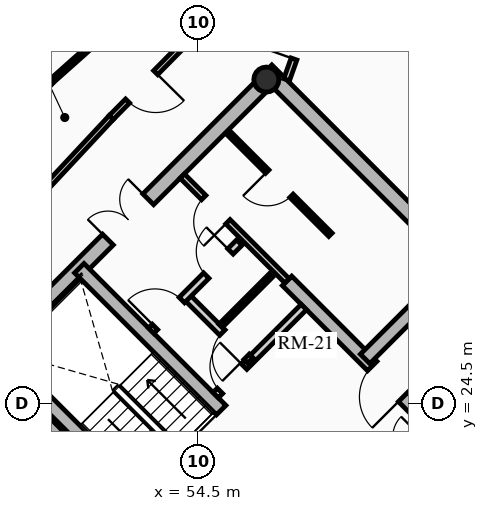
"""IFC4 building model, lengths in metres.
Left out: names, types, materials, properties, quantities, classifications, styles, units other than length and angle.
Written with IfcOpenShell. Run it as: python <this file> out.ifc"""

import sys

from ifc_helpers import new_model, si_unit, direction, frame, frame_2d, origin, origin_2d, place, context, subcontext, project, spatial, rectangle, hollow_circle, extrude, source, transform, mapped, element, fill, save


model = new_model("IFC4")
c1 = context("Model", 3, precision=1e-05, world=origin(), true_north=direction((0.0, 1.0)))
c2 = subcontext(c1, "Body", "Model", "MODEL_VIEW")
j1 = project(units=[si_unit("LENGTHUNIT", "METRE"), si_unit("PLANEANGLEUNIT", "RADIAN")], contexts=[c1])
p1 = place(None, origin())
s1 = spatial("IfcSite", under=j1, at=p1, CompositionType="ELEMENT")
p2 = place(p1, origin())
s2 = spatial("IfcBuilding", under=s1, at=p2, CompositionType="ELEMENT")
p3 = place(p2, frame((0.0, 0.0, 226.05)))
s3 = spatial("IfcBuildingStorey", under=s2, at=p3, CompositionType="ELEMENT", Elevation=226.05)
for number, where, z_axis, x_axis in (
    (1, (58.702, 15.732, 0.0), (0.0, 0.0, 1.0), (-0.707, 0.707, 0.0)),
    (2, (66.268, 23.298, 0.0), (0.0, 0.0, 1.0), (-0.707, 0.707, 0.0)),
):
    element("IfcWall", number, at=place(p3, frame(where, z_axis=z_axis, x_axis=x_axis)), inside=s3, PredefinedType="SHEAR", context=c2, shape_type="SweptSolid", body=[
        extrude(rectangle(XDim=14.1, YDim=0.4, at=frame_2d((7.05, 0.0))), origin(), (0.0, 0.0, 1.0), 3.2),
    ])
p4 = place(p3, frame((48.873, 25.561, 0.0), z_axis=(0.0, 0.0, 1.0), x_axis=(0.707106781187, 0.707106781187, 0.0)))
e3 = element("IfcWall", 3, at=p4, inside=s3, PredefinedType="SHEAR", context=c2, shape_type="SweptSolid", body=[
    extrude(rectangle(XDim=10.7, YDim=0.4, at=frame_2d((5.35, 0.0))), origin(), (0.0, 0.0, 1.0), 3.2),
])
m1 = source(origin(), c2, "Body", "SweptSolid", [
    extrude(rectangle(XDim=1.5, YDim=2.02, at=frame_2d((0.75, 1.01))), frame((0.0, 0.21, 0.0), z_axis=(0.0, -1.0, 0.0), x_axis=(1.0, 0.0, 0.0)), (0.0, 0.0, 1.0), 0.42),
])
p5 = place(p4, frame((4.6, 0.0, 0.0)))
e4 = element("IfcOpeningElement", 4, at=p5, cuts=e3, PredefinedType="OPENING", context=c2, shape_type="MappedRepresentation", body=[
    mapped(m1, transform((0.0, 0.0, 0.0), x_axis=(1.0, 0.0, 0.0), y_axis=(0.0, 1.0, 0.0), z_axis=(0.0, 0.0, 1.0), scale=1.0)),
])
p6 = place(p3, frame((61.06, 18.373, 0.0), z_axis=(0.0, 0.0, 1.0), x_axis=(-0.707106781187, 0.707106781187, 0.0)))
e5 = element("IfcWall", 5, at=p6, inside=s3, PredefinedType="SHEAR", context=c2, shape_type="SweptSolid", body=[
    extrude(rectangle(XDim=13.7, YDim=0.35, at=frame_2d((6.85, 0.0))), origin(), (0.0, 0.0, 1.0), 3.2),
])
m2 = source(origin(), c2, "Body", "SweptSolid", [
    extrude(rectangle(XDim=1.1, YDim=2.015, at=frame_2d((0.55, 1.007))), frame((0.0, 0.185, 0.0), z_axis=(0.0, -1.0, 0.0), x_axis=(1.0, 0.0, 0.0)), (0.0, 0.0, 1.0), 0.37),
])
p7 = place(p6, frame((4.85, 0.0, 0.0)))
e6 = element("IfcOpeningElement", 6, at=p7, cuts=e5, PredefinedType="OPENING", context=c2, shape_type="MappedRepresentation", body=[
    mapped(m2, transform((0.0, 0.0, 0.0), x_axis=(1.0, 0.0, 0.0), y_axis=(0.0, 1.0, 0.0), z_axis=(0.0, 0.0, 1.0), scale=1.0)),
])
p8 = place(p6, frame((0.625, 0.0, 0.0)))
e7 = element("IfcOpeningElement", 7, at=p8, cuts=e5, PredefinedType="OPENING", context=c2, shape_type="MappedRepresentation", body=[
    mapped(m2, transform((0.0, 0.0, 0.0), x_axis=(1.0, 0.0, 0.0), y_axis=(0.0, 1.0, 0.0), z_axis=(0.0, 0.0, 1.0), scale=1.0)),
])
p9 = place(p6, frame((2.625, 0.0, 0.0)))
e8 = element("IfcOpeningElement", 8, at=p9, cuts=e5, PredefinedType="OPENING", context=c2, shape_type="MappedRepresentation", body=[
    mapped(m2, transform((0.0, 0.0, 0.0), x_axis=(1.0, 0.0, 0.0), y_axis=(0.0, 1.0, 0.0), z_axis=(0.0, 0.0, 1.0), scale=1.0)),
])
m3 = source(origin(), c2, "Body", "SweptSolid", [
    extrude(rectangle(XDim=1.15, YDim=2.02, at=frame_2d((0.575, 1.01))), frame((0.0, 0.185, 0.0), z_axis=(0.0, -1.0, 0.0), x_axis=(1.0, 0.0, 0.0)), (0.0, 0.0, 1.0), 0.37),
])
p10 = place(p6, frame((7.27, 0.0, 0.0)))
e9 = element("IfcOpeningElement", 9, at=p10, cuts=e5, PredefinedType="OPENING", context=c2, shape_type="MappedRepresentation", body=[
    mapped(m3, transform((0.0, 0.0, 0.0), x_axis=(1.0, 0.0, 0.0), y_axis=(0.0, 1.0, 0.0), z_axis=(0.0, 0.0, 1.0), scale=1.0)),
])
p11 = place(p3, frame((63.627, 20.94, 0.0), z_axis=(0.0, 0.0, 1.0), x_axis=(-0.707119496762, 0.707094065383, 0.0)))
e10 = element("IfcWall", 10, at=p11, inside=s3, PredefinedType="SHEAR", context=c2, shape_type="SweptSolid", body=[
    extrude(rectangle(XDim=9.6, YDim=0.35, at=frame_2d((4.8, 0.0))), origin(), (0.0, 0.0, 1.0), 3.2),
])
p12 = place(p11, frame((5.28, 0.0, 0.0)))
e11 = element("IfcOpeningElement", 11, at=p12, cuts=e10, PredefinedType="OPENING", context=c2, shape_type="MappedRepresentation", body=[
    mapped(m3, transform((0.0, 0.0, 0.0), x_axis=(1.0, 0.0, 0.0), y_axis=(0.0, 1.0, 0.0), z_axis=(0.0, 0.0, 1.0), scale=1.0)),
])
p13 = place(p3, frame((53.922, 21.141, 0.0), z_axis=(0.0, 0.0, 1.0), x_axis=(-0.707106781187, 0.707106781187, 0.0)))
e12 = element("IfcWall", 12, at=p13, inside=s3, PredefinedType="SHEAR", context=c2, shape_type="SweptSolid", body=[
    extrude(rectangle(XDim=6.695, YDim=0.35, at=frame_2d((3.348, 0.0))), origin(), (0.0, 0.0, 1.0), 3.2),
])
p14 = place(p3, frame((58.893, 25.674, 0.0), z_axis=(0.0, 0.0, 1.0), x_axis=(0.707106781187, 0.707106781187, 0.0)))
e13 = element("IfcWall", 13, at=p14, inside=s3, PredefinedType="SHEAR", context=c2, shape_type="SweptSolid", body=[
    extrude(rectangle(XDim=3.285, YDim=0.35, at=frame_2d((1.643, 0.0))), origin(), (0.0, 0.0, 1.0), 3.2),
])
p15 = place(p3, frame((56.294, 33.024, 0.0), z_axis=(0.0, 0.0, 1.0), x_axis=(0.707106781187, 0.707106781187, 0.0)))
e14 = element("IfcColumn", 14, at=p15, inside=s3, PredefinedType="COLUMN", context=c2, shape_type="SweptSolid", body=[
    extrude(hollow_circle(Radius=0.33, WallThickness=0.025, at=origin_2d()), origin(), (0.0, 0.0, 1.0), 3.2),
])
p16 = place(p3, frame((58.214, 21.467, 0.0), z_axis=(0.0, 0.0, 1.0), x_axis=(0.707106781187, 0.707106781187, 0.0)))
e15 = element("IfcWall", 15, at=p16, inside=s3, PredefinedType="PARTITIONING", context=c2, shape_type="SweptSolid", body=[
    extrude(rectangle(XDim=3.28, YDim=0.2, at=frame_2d((1.64, 0.0))), origin(), (0.0, 0.0, 1.0), 2.975),
])
m4 = source(origin(), c2, "Body", "SweptSolid", [
    extrude(rectangle(XDim=1.5, YDim=2.02, at=frame_2d((0.75, 1.01))), frame((0.0, 0.11, 0.0), z_axis=(0.0, -1.0, 0.0), x_axis=(1.0, 0.0, 0.0)), (0.0, 0.0, 1.0), 0.22),
])
p17 = place(p16, frame((1.55, 0.0, 0.0)))
e16 = element("IfcOpeningElement", 16, at=p17, cuts=e15, PredefinedType="OPENING", context=c2, shape_type="MappedRepresentation", body=[
    mapped(m4, transform((0.0, 0.0, 0.0), x_axis=(1.0, 0.0, 0.0), y_axis=(0.0, 1.0, 0.0), z_axis=(0.0, 0.0, 1.0), scale=1.0)),
])
p18 = place(p3, frame((54.961, 24.719, 0.0), z_axis=(0.0, 0.0, 1.0), x_axis=(0.707106781187, 0.707106781187, 0.0)))
e17 = element("IfcWall", 17, at=p18, inside=s3, PredefinedType="PARTITIONING", context=c2, shape_type="SweptSolid", body=[
    extrude(rectangle(XDim=3.28, YDim=0.2, at=frame_2d((1.64, 0.0))), origin(), (0.0, 0.0, 1.0), 2.975),
])
m5 = source(origin(), c2, "Body", "SweptSolid", [
    extrude(rectangle(XDim=0.9, YDim=2.005, at=frame_2d((0.45, 1.002))), frame((0.0, 0.11, 0.0), z_axis=(0.0, -1.0, 0.0), x_axis=(1.0, 0.0, 0.0)), (0.0, 0.0, 1.0), 0.22),
])
p19 = place(p18, frame((0.16, 0.0, 0.0)))
e18 = element("IfcOpeningElement", 18, at=p19, cuts=e17, PredefinedType="OPENING", context=c2, shape_type="MappedRepresentation", body=[
    mapped(m5, transform((0.0, 0.0, 0.0), x_axis=(1.0, 0.0, 0.0), y_axis=(0.0, 1.0, 0.0), z_axis=(0.0, 0.0, 1.0), scale=1.0)),
])
p20 = place(p3, frame((55.874, 25.631, 0.0), z_axis=(0.0, 0.0, 1.0), x_axis=(-0.707157639372, 0.707055919343, 0.0)))
e19 = element("IfcWall", 19, at=p20, inside=s3, PredefinedType="PARTITIONING", context=c2, shape_type="SweptSolid", body=[
    extrude(rectangle(XDim=2.4, YDim=0.2, at=frame_2d((1.2, 0.0))), origin(), (0.0, 0.0, 1.0), 2.975),
])
p21 = place(p20, frame((0.14, 0.0, 0.0)))
e20 = element("IfcOpeningElement", 20, at=p21, cuts=e19, PredefinedType="OPENING", context=c2, shape_type="MappedRepresentation", body=[
    mapped(m5, transform((0.0, 0.0, 0.0), x_axis=(1.0, 0.0, 0.0), y_axis=(0.0, 1.0, 0.0), z_axis=(0.0, 0.0, 1.0), scale=1.0)),
])
p22 = place(p3, frame((53.264, 26.416, 0.0), z_axis=(0.0, 0.0, 1.0), x_axis=(0.707106781187, 0.707106781187, 0.0)))
e21 = element("IfcWall", 21, at=p22, inside=s3, PredefinedType="PARTITIONING", context=c2, shape_type="SweptSolid", body=[
    extrude(rectangle(XDim=3.28, YDim=0.2, at=frame_2d((1.64, 0.0))), origin(), (0.0, 0.0, 1.0), 2.975),
])
m6 = source(origin(), c2, "Body", "SweptSolid", [
    extrude(rectangle(XDim=1.0, YDim=2.015, at=frame_2d((0.5, 1.007))), frame((0.0, 0.11, 0.0), z_axis=(0.0, -1.0, 0.0), x_axis=(1.0, 0.0, 0.0)), (0.0, 0.0, 1.0), 0.22),
])
p23 = place(p22, frame((0.14, 0.0, 0.0)))
e22 = element("IfcOpeningElement", 22, at=p23, cuts=e21, PredefinedType="OPENING", context=c2, shape_type="MappedRepresentation", body=[
    mapped(m6, transform((0.0, 0.0, 0.0), x_axis=(1.0, 0.0, 0.0), y_axis=(0.0, 1.0, 0.0), z_axis=(0.0, 0.0, 1.0), scale=1.0)),
])
p24 = place(p22, frame((2.05, 0.0, 0.0)))
e23 = element("IfcOpeningElement", 23, at=p24, cuts=e21, PredefinedType="OPENING", context=c2, shape_type="MappedRepresentation", body=[
    mapped(m5, transform((0.0, 0.0, 0.0), x_axis=(1.0, 0.0, 0.0), y_axis=(0.0, 1.0, 0.0), z_axis=(0.0, 0.0, 1.0), scale=1.0)),
])
p25 = place(p3, frame((55.089, 26.543, 0.0), z_axis=(0.0, 0.0, 1.0), x_axis=(0.707106781187, 0.707106781187, 0.0)))
e24 = element("IfcWall", 24, at=p25, inside=s3, PredefinedType="PARTITIONING", context=c2, shape_type="SweptSolid", body=[
    extrude(rectangle(XDim=1.88, YDim=0.125, at=frame_2d((0.94, 0.0))), origin(), (0.0, 0.0, 1.0), 2.975),
])
p26 = place(p3, frame((56.839, 27.728, 0.0), z_axis=(0.0, 0.0, 1.0), x_axis=(-0.707106781187, 0.707106781187, 0.0)))
e25 = element("IfcWall", 25, at=p26, inside=s3, PredefinedType="PARTITIONING", context=c2, shape_type="SweptSolid", body=[
    extrude(rectangle(XDim=3.9, YDim=0.16, at=frame_2d((1.95, 0.0))), origin(), (0.0, 0.0, 1.0), 2.975),
])
m7 = source(origin(), c2, "Body", "SweptSolid", [
    extrude(rectangle(XDim=0.9, YDim=2.005, at=frame_2d((0.45, 1.002))), frame((0.0, 0.09, 0.0), z_axis=(0.0, -1.0, 0.0), x_axis=(1.0, 0.0, 0.0)), (0.0, 0.0, 1.0), 0.18),
])
p27 = place(p26, frame((2.2, 0.0, 0.0)))
e26 = element("IfcOpeningElement", 26, at=p27, cuts=e25, PredefinedType="OPENING", context=c2, shape_type="MappedRepresentation", body=[
    mapped(m7, transform((0.0, 0.0, 0.0), x_axis=(1.0, 0.0, 0.0), y_axis=(0.0, 1.0, 0.0), z_axis=(0.0, 0.0, 1.0), scale=1.0)),
])
p28 = place(p3, frame((57.981, 28.941, 0.0), z_axis=(0.0, 0.0, 1.0), x_axis=(-0.707074823725, 0.707138737204, 0.0)))
e27 = element("IfcWall", 27, at=p28, inside=s3, PredefinedType="PARTITIONING", context=c2, shape_type="SweptSolid", body=[
    extrude(rectangle(XDim=3.82, YDim=0.125, at=frame_2d((1.91, 0.0))), origin(), (0.0, 0.0, 1.0), 2.975),
])
m8 = source(origin(), c2, "Body", "SweptSolid", [
    extrude(rectangle(XDim=0.9, YDim=2.005, at=frame_2d((0.45, 1.002))), frame((0.0, 0.073, 0.0), z_axis=(0.0, -1.0, 0.0), x_axis=(1.0, 0.0, 0.0)), (0.0, 0.0, 1.0), 0.145),
])
p29 = place(p28, frame((1.45, 0.0, 0.0)))
e28 = element("IfcOpeningElement", 28, at=p29, cuts=e27, PredefinedType="OPENING", context=c2, shape_type="MappedRepresentation", body=[
    mapped(m8, transform((0.0, 0.0, 0.0), x_axis=(1.0, 0.0, 0.0), y_axis=(0.0, 1.0, 0.0), z_axis=(0.0, 0.0, 1.0), scale=1.0)),
])
p30 = place(p3, frame((54.506, 34.344, 0.0), z_axis=(0.0, 0.0, 1.0), x_axis=(-0.703053402247, -0.711137056824, 0.0)))
e29 = element("IfcWall", 29, at=p30, inside=s3, PredefinedType="PARTITIONING", context=c2, shape_type="SweptSolid", body=[
    extrude(rectangle(XDim=3.262, YDim=0.15, at=frame_2d((1.631, 0.0))), origin(), (0.0, 0.0, 1.0), 2.612),
])
m9 = source(origin(), c2, "Body", "SweptSolid", [
    extrude(rectangle(XDim=1.05, YDim=2.015, at=frame_2d((0.525, 1.007))), frame((0.0, 0.085, 0.0), z_axis=(0.0, -1.0, 0.0), x_axis=(1.0, 0.0, 0.0)), (0.0, 0.0, 1.0), 0.17),
])
p31 = place(p30, frame((1.599, 0.0, 0.0)))
e30 = element("IfcOpeningElement", 30, at=p31, cuts=e29, PredefinedType="OPENING", context=c2, shape_type="MappedRepresentation", body=[
    mapped(m9, transform((0.0, 0.0, 0.0), x_axis=(1.0, 0.0, 0.0), y_axis=(0.0, 1.0, 0.0), z_axis=(0.0, 0.0, 1.0), scale=1.0)),
])
p32 = place(p3, frame((52.212, 32.024, 0.0), z_axis=(0.0, 0.0, 1.0), x_axis=(-0.682158998173, -0.731203871169, 0.0)))
e31 = element("IfcWall", 31, at=p32, inside=s3, PredefinedType="PARTITIONING", context=c2, shape_type="SweptSolid", body=[
    extrude(rectangle(XDim=6.282, YDim=0.15, at=frame_2d((3.141, 0.0))), origin(), (0.0, 0.0, 1.0), 2.545),
])
p33 = place(p3, frame((56.828, 33.021, 0.0), z_axis=(0.0, 0.0, 1.0), x_axis=(0.334788446034, 0.942293317605, 0.0)))
e32 = element("IfcWall", 32, at=p33, inside=s3, PredefinedType="PARTITIONING", context=c2, shape_type="SweptSolid", body=[
    extrude(rectangle(XDim=1.829, YDim=0.16, at=frame_2d((0.915, 0.0))), origin(), (0.0, 0.0, 1.0), 2.545),
])
m10 = source(origin(), c2, "Body", "SweptSolid", [
    extrude(rectangle(XDim=1.05, YDim=2.015, at=frame_2d((0.525, 1.007))), frame((0.0, 0.09, 0.0), z_axis=(0.0, -1.0, 0.0), x_axis=(1.0, 0.0, 0.0)), (0.0, 0.0, 1.0), 0.18),
])
p34 = place(p33, frame((0.579, 0.0, 0.0)))
e33 = element("IfcOpeningElement", 33, at=p34, cuts=e32, PredefinedType="OPENING", context=c2, shape_type="MappedRepresentation", body=[
    mapped(m10, transform((0.0, 0.0, 0.0), x_axis=(1.0, 0.0, 0.0), y_axis=(0.0, 1.0, 0.0), z_axis=(0.0, 0.0, 1.0), scale=1.0)),
])
p35 = place(p3, frame((53.206, 35.268, 0.0), z_axis=(0.0, 0.0, 1.0), x_axis=(-0.746677760999, -0.665185929819, 0.0)))
e34 = element("IfcWall", 34, at=p35, inside=s3, PredefinedType="PARTITIONING", context=c2, shape_type="SweptSolid", body=[
    extrude(rectangle(XDim=3.445, YDim=0.125, at=frame_2d((1.723, 0.0))), origin(), (0.0, 0.0, 1.0), 2.612),
])
p36 = place(p3, frame((50.634, 32.977, 0.0), z_axis=(0.0, 0.0, 1.0), x_axis=(-0.659241945747, -0.751930885765, 0.0)))
e35 = element("IfcWall", 35, at=p36, inside=s3, PredefinedType="PARTITIONING", context=c2, shape_type="SweptSolid", body=[
    extrude(rectangle(XDim=5.624, YDim=0.125, at=frame_2d((2.812, 0.0))), origin(), (0.0, 0.0, 1.0), 2.545),
])
p37 = place(p36, frame((2.362, 0.0, 0.0)))
e36 = element("IfcOpeningElement", 36, at=p37, cuts=e35, PredefinedType="OPENING", context=c2, shape_type="MappedRepresentation", body=[
    mapped(m8, transform((0.0, 0.0, 0.0), x_axis=(1.0, 0.0, 0.0), y_axis=(0.0, 1.0, 0.0), z_axis=(0.0, 0.0, 1.0), scale=1.0)),
])
m11 = source(origin(), c2, "Body", "SweptSolid", [
    extrude(rectangle(XDim=1.15, YDim=2.02, at=frame_2d((0.575, 1.01))), frame((0.0, 0.025, 0.0), z_axis=(0.0, -1.0, 0.0), x_axis=(1.0, 0.0, 0.0)), (0.0, 0.0, 1.0), 0.05),
])
p38 = place(p10, origin())
e37 = element("IfcDoor", 37, at=p38, inside=s3, OperationType="SINGLE_SWING_RIGHT", PredefinedType="DOOR", context=c2, shape_type="MappedRepresentation", body=[
    mapped(m11, transform((0.0, 0.0, 0.0), x_axis=(1.0, 0.0, 0.0), y_axis=(0.0, 1.0, 0.0), z_axis=(0.0, 0.0, 1.0), scale=1.0)),
])
fill(e9, e37)
p39 = place(p12, origin())
e38 = element("IfcDoor", 38, at=p39, inside=s3, OperationType="SINGLE_SWING_LEFT", PredefinedType="DOOR", context=c2, shape_type="MappedRepresentation", body=[
    mapped(m11, transform((0.0, 0.0, 0.0), x_axis=(1.0, 0.0, 0.0), y_axis=(0.0, 1.0, 0.0), z_axis=(0.0, 0.0, 1.0), scale=1.0)),
])
fill(e11, e38)
m12 = source(origin(), c2, "Body", "SweptSolid", [
    extrude(rectangle(XDim=1.5, YDim=2.02, at=frame_2d((0.75, 1.01))), frame((0.0, 0.025, 0.0), z_axis=(0.0, -1.0, 0.0), x_axis=(1.0, 0.0, 0.0)), (0.0, 0.0, 1.0), 0.05),
])
p40 = place(p5, origin())
e39 = element("IfcDoor", 39, at=p40, inside=s3, OperationType="DOUBLE_DOOR_SINGLE_SWING", PredefinedType="DOOR", context=c2, shape_type="MappedRepresentation", body=[
    mapped(m12, transform((0.0, 0.0, 0.0), x_axis=(1.0, 0.0, 0.0), y_axis=(0.0, 1.0, 0.0), z_axis=(0.0, 0.0, 1.0), scale=1.0)),
])
fill(e4, e39)
m13 = source(origin(), c2, "Body", "SweptSolid", [
    extrude(rectangle(XDim=0.9, YDim=2.005, at=frame_2d((0.45, 1.002))), frame((0.0, 0.025, 0.0), z_axis=(0.0, -1.0, 0.0), x_axis=(1.0, 0.0, 0.0)), (0.0, 0.0, 1.0), 0.05),
])
p41 = place(p19, origin())
e40 = element("IfcDoor", 40, at=p41, inside=s3, OperationType="SINGLE_SWING_RIGHT", PredefinedType="DOOR", context=c2, shape_type="MappedRepresentation", body=[
    mapped(m13, transform((0.0, 0.0, 0.0), x_axis=(1.0, 0.0, 0.0), y_axis=(0.0, 1.0, 0.0), z_axis=(0.0, 0.0, 1.0), scale=1.0)),
])
fill(e18, e40)
m14 = source(origin(), c2, "Body", "SweptSolid", [
    extrude(rectangle(XDim=1.0, YDim=2.015, at=frame_2d((0.5, 1.007))), frame((0.0, 0.025, 0.0), z_axis=(0.0, -1.0, 0.0), x_axis=(1.0, 0.0, 0.0)), (0.0, 0.0, 1.0), 0.05),
])
p42 = place(p23, origin())
e41 = element("IfcDoor", 41, at=p42, inside=s3, OperationType="SINGLE_SWING_LEFT", PredefinedType="DOOR", context=c2, shape_type="MappedRepresentation", body=[
    mapped(m14, transform((0.0, 0.0, 0.0), x_axis=(1.0, 0.0, 0.0), y_axis=(0.0, 1.0, 0.0), z_axis=(0.0, 0.0, 1.0), scale=1.0)),
])
fill(e22, e41)
p43 = place(p21, origin())
e42 = element("IfcDoor", 42, at=p43, inside=s3, OperationType="SINGLE_SWING_LEFT", PredefinedType="DOOR", context=c2, shape_type="MappedRepresentation", body=[
    mapped(m13, transform((0.0, 0.0, 0.0), x_axis=(1.0, 0.0, 0.0), y_axis=(0.0, 1.0, 0.0), z_axis=(0.0, 0.0, 1.0), scale=1.0)),
])
fill(e20, e42)
p44 = place(p24, origin())
e43 = element("IfcDoor", 43, at=p44, inside=s3, OperationType="SINGLE_SWING_RIGHT", PredefinedType="DOOR", context=c2, shape_type="MappedRepresentation", body=[
    mapped(m13, transform((0.0, 0.0, 0.0), x_axis=(1.0, 0.0, 0.0), y_axis=(0.0, 1.0, 0.0), z_axis=(0.0, 0.0, 1.0), scale=1.0)),
])
fill(e23, e43)
p45 = place(p27, origin())
e44 = element("IfcDoor", 44, at=p45, inside=s3, OperationType="SINGLE_SWING_LEFT", PredefinedType="DOOR", context=c2, shape_type="MappedRepresentation", body=[
    mapped(m13, transform((0.0, 0.0, 0.0), x_axis=(1.0, 0.0, 0.0), y_axis=(0.0, 1.0, 0.0), z_axis=(0.0, 0.0, 1.0), scale=1.0)),
])
fill(e26, e44)
p46 = place(p29, origin())
e45 = element("IfcDoor", 45, at=p46, inside=s3, OperationType="SINGLE_SWING_RIGHT", PredefinedType="DOOR", context=c2, shape_type="MappedRepresentation", body=[
    mapped(m13, transform((0.0, 0.0, 0.0), x_axis=(1.0, 0.0, 0.0), y_axis=(0.0, 1.0, 0.0), z_axis=(0.0, 0.0, 1.0), scale=1.0)),
])
fill(e28, e45)
m15 = source(origin(), c2, "Body", "SweptSolid", [
    extrude(rectangle(XDim=1.05, YDim=2.015, at=frame_2d((0.525, 1.007))), frame((0.0, 0.025, 0.0), z_axis=(0.0, -1.0, 0.0), x_axis=(1.0, 0.0, 0.0)), (0.0, 0.0, 1.0), 0.05),
])
p47 = place(p34, origin())
e46 = element("IfcDoor", 46, at=p47, inside=s3, OperationType="SINGLE_SWING_LEFT", PredefinedType="DOOR", context=c2, shape_type="MappedRepresentation", body=[
    mapped(m15, transform((0.0, 0.0, 0.0), x_axis=(1.0, 0.0, 0.0), y_axis=(0.0, 1.0, 0.0), z_axis=(0.0, 0.0, 1.0), scale=1.0)),
])
fill(e33, e46)
p48 = place(p31, origin())
e47 = element("IfcDoor", 47, at=p48, inside=s3, OperationType="SINGLE_SWING_LEFT", PredefinedType="DOOR", context=c2, shape_type="MappedRepresentation", body=[
    mapped(m15, transform((0.0, 0.0, 0.0), x_axis=(1.0, 0.0, 0.0), y_axis=(0.0, 1.0, 0.0), z_axis=(0.0, 0.0, 1.0), scale=1.0)),
])
fill(e30, e47)
save(model, sys.argv[1])
